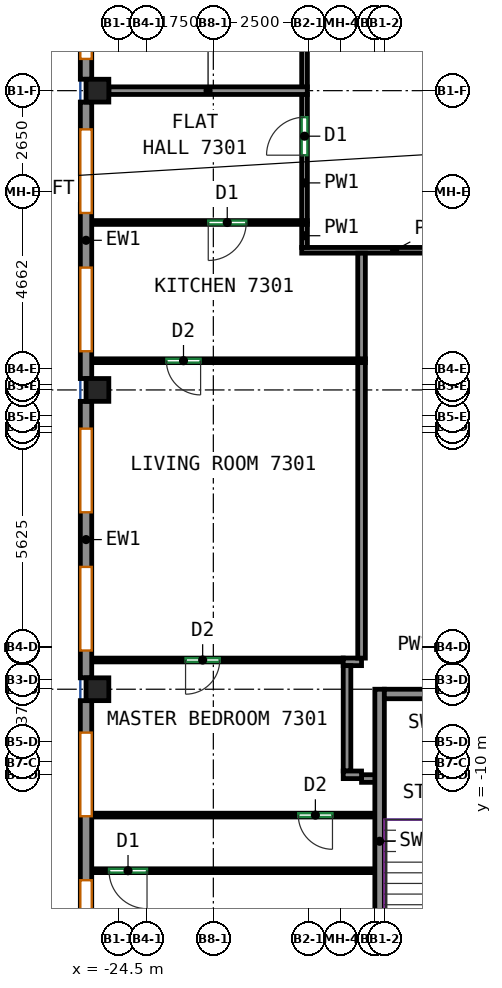
"""IFC4 building model, lengths in metres.
Left out: names, types, materials, properties, quantities, classifications, styles, units other than length and angle.
Written with IfcOpenShell. Run it as: python <this file> out.ifc"""

import sys

from ifc_helpers import new_model, si_unit, direction, frame, frame_2d, origin, origin_2d, place, context, subcontext, project, spatial, rectangle, extrude, source, transform, mapped, element, fill, save


model = new_model("IFC4")
c1 = context("Model", 3, precision=1e-05, world=origin(), true_north=direction((0.0, 1.0)))
c2 = subcontext(c1, "Body", "Model", "MODEL_VIEW")
j1 = project(units=[si_unit("LENGTHUNIT", "METRE"), si_unit("PLANEANGLEUNIT", "RADIAN")], contexts=[c1])
p1 = place(None, origin())
s1 = spatial("IfcSite", under=j1, at=p1, CompositionType="ELEMENT")
p2 = place(p1, origin())
s2 = spatial("IfcBuilding", under=s1, at=p2, CompositionType="ELEMENT")
p3 = place(p2, frame((0.0, 0.0, 295.0)))
s3 = spatial("IfcBuildingStorey", under=s2, at=p3, CompositionType="ELEMENT", Elevation=295.0)
m1 = source(origin(), c2, "Body", "SweptSolid", [
    extrude(rectangle(XDim=0.6, YDim=0.6, at=origin_2d()), origin(), (0.0, 0.0, 1.0), 3.12),
])
for number, where, z_axis, x_axis in (
    (1, (-25.05, -7.75, 0.0), (0.0, 0.0, 1.0), (1.0, 0.0, 0.0)),
    (2, (-25.05, 0.125, 0.0), (0.0, 0.0, 1.0), (1.0, 0.0, 0.0)),
    (3, (-25.05, 8.0, 0.0), (0.0, 0.0, 1.0), (1.0, 0.0, 0.0)),
):
    element("IfcColumn", number, at=place(p3, frame(where, z_axis=z_axis, x_axis=x_axis)), inside=s3, PredefinedType="COLUMN", context=c2, shape_type="MappedRepresentation", body=[
        mapped(m1, transform((0.0, 0.0, 0.0))),
    ])
m2 = source(origin(), c2, "Body", "SweptSolid", [
    extrude(rectangle(XDim=8.0, YDim=0.25, at=frame_2d((4.0, 0.0))), origin(), (0.0, 0.0, 1.0), 3.12),
])
p4 = place(p3, frame((-17.625, -15.75, 0.0), z_axis=(0.0, 0.0, 1.0), x_axis=(0.0, 1.0, 0.0)))
e4 = element("IfcWall", 4, at=p4, inside=s3, PredefinedType="SHEAR", context=c2, shape_type="MappedRepresentation", body=[
    mapped(m2, transform((0.0, 0.0, 0.0))),
])
m3 = source(origin(), c2, "Body", "SweptSolid", [
    extrude(rectangle(XDim=3.7, YDim=0.25, at=frame_2d((1.85, 0.0))), origin(), (0.0, 0.0, 1.0), 3.12),
])
p5 = place(p3, frame((-17.5, -7.875, 0.0), z_axis=(0.0, 0.0, 1.0), x_axis=(1.0, 0.0, 0.0)))
e5 = element("IfcWall", 5, at=p5, inside=s3, PredefinedType="SHEAR", context=c2, shape_type="MappedRepresentation", body=[
    mapped(m3, transform((0.0, 0.0, 0.0))),
])
m4 = source(origin(), c2, "Body", "SweptSolid", [
    extrude(rectangle(XDim=13.082, YDim=0.3, at=frame_2d((6.541, 0.0))), origin(), (0.0, 0.0, 1.0), 3.12),
])
p6 = place(p3, frame((-25.35, 21.382, 0.0), z_axis=(0.0, 0.0, 1.0), x_axis=(0.0, -1.0, 0.0)))
e6 = element("IfcWall", 6, at=p6, inside=s3, PredefinedType="SOLIDWALL", context=c2, shape_type="MappedRepresentation", body=[
    mapped(m4, transform((0.0, 0.0, 0.0))),
])
p7 = place(p6, frame((0.535, 0.0, 0.8)))
e7 = element("IfcOpeningElement", 7, at=p7, cuts=e6, PredefinedType="OPENING", context=c2, shape_type="SweptSolid", body=[
    extrude(rectangle(XDim=2.2, YDim=2.05, at=frame_2d((1.1, 1.025))), frame((0.0, 0.16, 0.0), z_axis=(0.0, -1.0, 0.0), x_axis=(1.0, 0.0, 0.0)), (0.0, 0.0, 1.0), 0.32),
])
p8 = place(p6, frame((3.806, 0.0, 0.8)))
e8 = element("IfcOpeningElement", 8, at=p8, cuts=e6, PredefinedType="OPENING", context=c2, shape_type="SweptSolid", body=[
    extrude(rectangle(XDim=2.2, YDim=2.05, at=frame_2d((1.1, 1.025))), frame((0.0, 0.16, 0.0), z_axis=(0.0, -1.0, 0.0), x_axis=(1.0, 0.0, 0.0)), (0.0, 0.0, 1.0), 0.32),
])
p9 = place(p6, frame((7.076, 0.0, 0.8)))
e9 = element("IfcOpeningElement", 9, at=p9, cuts=e6, PredefinedType="OPENING", context=c2, shape_type="SweptSolid", body=[
    extrude(rectangle(XDim=2.2, YDim=2.05, at=frame_2d((1.1, 1.025))), frame((0.0, 0.16, 0.0), z_axis=(0.0, -1.0, 0.0), x_axis=(1.0, 0.0, 0.0)), (0.0, 0.0, 1.0), 0.32),
])
p10 = place(p6, frame((10.347, 0.0, 0.8)))
e10 = element("IfcOpeningElement", 10, at=p10, cuts=e6, PredefinedType="OPENING", context=c2, shape_type="SweptSolid", body=[
    extrude(rectangle(XDim=2.2, YDim=2.05, at=frame_2d((1.1, 1.025))), frame((0.0, 0.16, 0.0), z_axis=(0.0, -1.0, 0.0), x_axis=(1.0, 0.0, 0.0)), (0.0, 0.0, 1.0), 0.32),
])
m5 = source(origin(), c2, "Body", "SweptSolid", [
    extrude(rectangle(XDim=7.275, YDim=0.3, at=frame_2d((3.637, 0.0))), origin(), (0.0, 0.0, 1.0), 3.12),
])
p11 = place(p3, frame((-25.35, 7.7, 0.0), z_axis=(0.0, 0.0, 1.0), x_axis=(0.0, -1.0, 0.0)))
e11 = element("IfcWall", 11, at=p11, inside=s3, PredefinedType="SOLIDWALL", context=c2, shape_type="MappedRepresentation", body=[
    mapped(m5, transform((0.0, 0.0, 0.0))),
])
p12 = place(p11, frame((0.719, 0.0, 0.8)))
e12 = element("IfcOpeningElement", 12, at=p12, cuts=e11, PredefinedType="OPENING", context=c2, shape_type="SweptSolid", body=[
    extrude(rectangle(XDim=2.2, YDim=2.05, at=frame_2d((1.1, 1.025))), frame((0.0, 0.16, 0.0), z_axis=(0.0, -1.0, 0.0), x_axis=(1.0, 0.0, 0.0)), (0.0, 0.0, 1.0), 0.32),
])
p13 = place(p11, frame((4.356, 0.0, 0.8)))
e13 = element("IfcOpeningElement", 13, at=p13, cuts=e11, PredefinedType="OPENING", context=c2, shape_type="SweptSolid", body=[
    extrude(rectangle(XDim=2.2, YDim=2.05, at=frame_2d((1.1, 1.025))), frame((0.0, 0.16, 0.0), z_axis=(0.0, -1.0, 0.0), x_axis=(1.0, 0.0, 0.0)), (0.0, 0.0, 1.0), 0.32),
])
p14 = place(p3, frame((-25.35, -0.175, 0.0), z_axis=(0.0, 0.0, 1.0), x_axis=(0.0, -1.0, 0.0)))
e14 = element("IfcWall", 14, at=p14, inside=s3, PredefinedType="SOLIDWALL", context=c2, shape_type="MappedRepresentation", body=[
    mapped(m5, transform((0.0, 0.0, 0.0))),
])
p15 = place(p14, frame((0.719, 0.0, 0.8)))
e15 = element("IfcOpeningElement", 15, at=p15, cuts=e14, PredefinedType="OPENING", context=c2, shape_type="SweptSolid", body=[
    extrude(rectangle(XDim=2.2, YDim=2.05, at=frame_2d((1.1, 1.025))), frame((0.0, 0.16, 0.0), z_axis=(0.0, -1.0, 0.0), x_axis=(1.0, 0.0, 0.0)), (0.0, 0.0, 1.0), 0.32),
])
p16 = place(p14, frame((4.356, 0.0, 0.8)))
e16 = element("IfcOpeningElement", 16, at=p16, cuts=e14, PredefinedType="OPENING", context=c2, shape_type="SweptSolid", body=[
    extrude(rectangle(XDim=2.2, YDim=2.05, at=frame_2d((1.1, 1.025))), frame((0.0, 0.16, 0.0), z_axis=(0.0, -1.0, 0.0), x_axis=(1.0, 0.0, 0.0)), (0.0, 0.0, 1.0), 0.32),
])
m6 = source(origin(), c2, "Body", "SweptSolid", [
    extrude(rectangle(XDim=11.65, YDim=0.3, at=frame_2d((5.825, 0.0))), origin(), (0.0, 0.0, 1.0), 3.12),
])
p17 = place(p3, frame((-25.35, -8.05, 0.0), z_axis=(0.0, 0.0, 1.0), x_axis=(0.0, -1.0, 0.0)))
e17 = element("IfcWall", 17, at=p17, inside=s3, PredefinedType="SOLIDWALL", context=c2, shape_type="MappedRepresentation", body=[
    mapped(m6, transform((0.0, 0.0, 0.0))),
])
p18 = place(p17, frame((0.842, 0.0, 0.8)))
e18 = element("IfcOpeningElement", 18, at=p18, cuts=e17, PredefinedType="OPENING", context=c2, shape_type="SweptSolid", body=[
    extrude(rectangle(XDim=2.2, YDim=2.05, at=frame_2d((1.1, 1.025))), frame((0.0, 0.16, 0.0), z_axis=(0.0, -1.0, 0.0), x_axis=(1.0, 0.0, 0.0)), (0.0, 0.0, 1.0), 0.32),
])
p19 = place(p17, frame((4.725, 0.0, 0.8)))
e19 = element("IfcOpeningElement", 19, at=p19, cuts=e17, PredefinedType="OPENING", context=c2, shape_type="SweptSolid", body=[
    extrude(rectangle(XDim=2.2, YDim=2.05, at=frame_2d((1.1, 1.025))), frame((0.0, 0.16, 0.0), z_axis=(0.0, -1.0, 0.0), x_axis=(1.0, 0.0, 0.0)), (0.0, 0.0, 1.0), 0.32),
])
p20 = place(p17, frame((8.617, 0.0, 0.8)))
e20 = element("IfcOpeningElement", 20, at=p20, cuts=e17, PredefinedType="OPENING", context=c2, shape_type="SweptSolid", body=[
    extrude(rectangle(XDim=0.8, YDim=2.05, at=frame_2d((0.4, 1.025))), frame((0.0, 0.16, 0.0), z_axis=(0.0, -1.0, 0.0), x_axis=(1.0, 0.0, 0.0)), (0.0, 0.0, 1.0), 0.32),
])
p21 = place(p17, frame((9.742, 0.0, 0.8)))
e21 = element("IfcOpeningElement", 21, at=p21, cuts=e17, PredefinedType="OPENING", context=c2, shape_type="SweptSolid", body=[
    extrude(rectangle(XDim=1.05, YDim=2.05, at=frame_2d((0.525, 1.025))), frame((0.0, 0.16, 0.0), z_axis=(0.0, -1.0, 0.0), x_axis=(1.0, 0.0, 0.0)), (0.0, 0.0, 1.0), 0.32),
])
p22 = place(p3, frame((-19.675, 3.8, 0.0), z_axis=(0.0, 0.0, 1.0), x_axis=(1.0, 0.0, 0.0)))
e22 = element("IfcWall", 22, at=p22, inside=s3, PredefinedType="PARTITIONING", context=c2, shape_type="SweptSolid", body=[
    extrude(rectangle(XDim=4.89, YDim=0.15, at=frame_2d((2.445, 0.0))), origin(), (0.0, 0.0, 1.0), 3.12),
])
p23 = place(p3, frame((-19.6, 3.875, 0.0), z_axis=(0.0, 0.0, 1.0), x_axis=(0.0, 1.0, 0.0)))
e23 = element("IfcWall", 23, at=p23, inside=s3, PredefinedType="PARTITIONING", context=c2, shape_type="SweptSolid", body=[
    extrude(rectangle(XDim=0.616, YDim=0.15, at=frame_2d((0.308, 0.0))), origin(), (0.0, 0.0, 1.0), 3.12),
])
p24 = place(p3, frame((-19.6, 4.571, 0.0), z_axis=(0.0, 0.0, 1.0), x_axis=(0.0, 1.0, 0.0)))
e24 = element("IfcWall", 24, at=p24, inside=s3, PredefinedType="PARTITIONING", context=c2, shape_type="SweptSolid", body=[
    extrude(rectangle(XDim=3.339, YDim=0.15, at=frame_2d((1.669, 0.0))), origin(), (0.0, 0.0, 1.0), 3.12),
])
p25 = place(p24, frame((1.731, 0.0, 0.0)))
e25 = element("IfcOpeningElement", 25, at=p25, cuts=e24, PredefinedType="OPENING", context=c2, shape_type="SweptSolid", body=[
    extrude(rectangle(XDim=1.0, YDim=2.1, at=frame_2d((0.5, 1.05))), frame((0.0, 0.085, 0.0), z_axis=(0.0, -1.0, 0.0), x_axis=(1.0, 0.0, 0.0)), (0.0, 0.0, 1.0), 0.17),
])
p26 = place(p3, frame((-19.6, 8.09, 0.0), z_axis=(0.0, 0.0, 1.0), x_axis=(0.0, 1.0, 0.0)))
e26 = element("IfcWall", 26, at=p26, inside=s3, PredefinedType="PARTITIONING", context=c2, shape_type="SweptSolid", body=[
    extrude(rectangle(XDim=15.635, YDim=0.15, at=frame_2d((7.817, 0.0))), origin(), (0.0, 0.0, 1.0), 3.12),
])
p27 = place(p3, frame((-17.75, -12.525, 0.0), z_axis=(0.0, 0.0, 1.0), x_axis=(-1.0, 0.0, 0.0)))
e27 = element("IfcWall", 27, at=p27, inside=s3, PredefinedType="PARTITIONING", context=c2, shape_type="SweptSolid", body=[
    extrude(rectangle(XDim=7.5, YDim=0.1, at=frame_2d((3.75, 0.0))), origin(), (0.0, 0.0, 1.0), 3.12),
])
p28 = place(p27, frame((5.995, 0.0, 0.0)))
e28 = element("IfcOpeningElement", 28, at=p28, cuts=e27, PredefinedType="OPENING", context=c2, shape_type="SweptSolid", body=[
    extrude(rectangle(XDim=1.0, YDim=2.1, at=frame_2d((0.5, 1.05))), frame((0.0, 0.06, 0.0), z_axis=(0.0, -1.0, 0.0), x_axis=(1.0, 0.0, 0.0)), (0.0, 0.0, 1.0), 0.12),
])
p29 = place(p3, frame((-17.75, -11.062, 0.0), z_axis=(0.0, 0.0, 1.0), x_axis=(-1.0, 0.0, 0.0)))
e29 = element("IfcWall", 29, at=p29, inside=s3, PredefinedType="PARTITIONING", context=c2, shape_type="SweptSolid", body=[
    extrude(rectangle(XDim=7.5, YDim=0.1, at=frame_2d((3.75, 0.0))), origin(), (0.0, 0.0, 1.0), 3.12),
])
p30 = place(p29, frame((1.115, 0.0, 0.0)))
e30 = element("IfcOpeningElement", 30, at=p30, cuts=e29, PredefinedType="OPENING", context=c2, shape_type="SweptSolid", body=[
    extrude(rectangle(XDim=0.9, YDim=2.1, at=frame_2d((0.45, 1.05))), frame((0.0, 0.06, 0.0), z_axis=(0.0, -1.0, 0.0), x_axis=(1.0, 0.0, 0.0)), (0.0, 0.0, 1.0), 0.12),
])
p31 = place(p3, frame((-18.582, -6.981, 0.0), z_axis=(0.0, 0.0, 1.0), x_axis=(-1.0, 0.0, 0.0)))
e31 = element("IfcWall", 31, at=p31, inside=s3, PredefinedType="PARTITIONING", context=c2, shape_type="SweptSolid", body=[
    extrude(rectangle(XDim=6.668, YDim=0.1, at=frame_2d((3.334, 0.0))), origin(), (0.0, 0.0, 1.0), 3.12),
])
p32 = place(p31, frame((3.249, 0.0, 0.0)))
e32 = element("IfcOpeningElement", 32, at=p32, cuts=e31, PredefinedType="OPENING", context=c2, shape_type="SweptSolid", body=[
    extrude(rectangle(XDim=0.9, YDim=2.1, at=frame_2d((0.45, 1.05))), frame((0.0, 0.06, 0.0), z_axis=(0.0, -1.0, 0.0), x_axis=(1.0, 0.0, 0.0)), (0.0, 0.0, 1.0), 0.12),
])
p33 = place(p3, frame((-17.7, -10.1, 0.0), z_axis=(0.0, 0.0, 1.0), x_axis=(-1.0, 0.0, 0.0)))
e33 = element("IfcWall", 33, at=p33, inside=s3, PredefinedType="PARTITIONING", context=c2, shape_type="SweptSolid", body=[
    extrude(rectangle(XDim=0.4, YDim=0.2, at=frame_2d((0.2, 0.0))), origin(), (0.0, 0.0, 1.0), 3.12),
])
p34 = place(p3, frame((-18.582, -7.029, 0.0), z_axis=(0.0, 0.0, 1.0), x_axis=(1.0, 0.0, 0.0)))
e34 = element("IfcWall", 34, at=p34, inside=s3, PredefinedType="PARTITIONING", context=c2, shape_type="SweptSolid", body=[
    extrude(rectangle(XDim=0.482, YDim=0.2, at=frame_2d((0.241, 0.0))), origin(), (0.0, 0.0, 1.0), 3.12),
])
p35 = place(p3, frame((-18.482, -9.902, 0.0), z_axis=(0.0, 0.0, 1.0), x_axis=(0.0, 1.0, 0.0)))
e35 = element("IfcWall", 35, at=p35, inside=s3, PredefinedType="PARTITIONING", context=c2, shape_type="SweptSolid", body=[
    extrude(rectangle(XDim=2.773, YDim=0.2, at=frame_2d((1.387, 0.0))), origin(), (0.0, 0.0, 1.0), 3.12),
])
p36 = place(p3, frame((-18.1, -10.002, 0.0), z_axis=(0.0, 0.0, 1.0), x_axis=(-1.0, 0.0, 0.0)))
e36 = element("IfcWall", 36, at=p36, inside=s3, PredefinedType="PARTITIONING", context=c2, shape_type="SweptSolid", body=[
    extrude(rectangle(XDim=0.482, YDim=0.2, at=frame_2d((0.241, 0.0))), origin(), (0.0, 0.0, 1.0), 3.12),
])
p37 = place(p3, frame((-18.0, 0.894, 0.0), z_axis=(0.0, 0.0, 1.0), x_axis=(-1.0, 0.0, 0.0)))
e37 = element("IfcWall", 37, at=p37, inside=s3, PredefinedType="PARTITIONING", context=c2, shape_type="SweptSolid", body=[
    extrude(rectangle(XDim=7.25, YDim=0.1, at=frame_2d((3.625, 0.0))), origin(), (0.0, 0.0, 1.0), 3.12),
])
p38 = place(p37, frame((4.335, 0.0, 0.0)))
e38 = element("IfcOpeningElement", 38, at=p38, cuts=e37, PredefinedType="OPENING", context=c2, shape_type="SweptSolid", body=[
    extrude(rectangle(XDim=0.9, YDim=2.1, at=frame_2d((0.45, 1.05))), frame((0.0, 0.06, 0.0), z_axis=(0.0, -1.0, 0.0), x_axis=(1.0, 0.0, 0.0)), (0.0, 0.0, 1.0), 0.12),
])
p39 = place(p3, frame((-18.1, -6.931, 0.0), z_axis=(0.0, 0.0, 1.0), x_axis=(0.0, 1.0, 0.0)))
e39 = element("IfcWall", 39, at=p39, inside=s3, PredefinedType="PARTITIONING", context=c2, shape_type="SweptSolid", body=[
    extrude(rectangle(XDim=7.775, YDim=0.2, at=frame_2d((3.887, 0.0))), origin(), (0.0, 0.0, 1.0), 3.12),
])
p40 = place(p3, frame((-19.527, 4.531, 0.0), z_axis=(0.0, 0.0, 1.0), x_axis=(-1.0, 0.0, 0.0)))
e40 = element("IfcWall", 40, at=p40, inside=s3, PredefinedType="PARTITIONING", context=c2, shape_type="SweptSolid", body=[
    extrude(rectangle(XDim=5.723, YDim=0.1, at=frame_2d((2.861, 0.0))), origin(), (0.0, 0.0, 1.0), 3.12),
])
p41 = place(p40, frame((1.607, 0.0, 0.0)))
e41 = element("IfcOpeningElement", 41, at=p41, cuts=e40, PredefinedType="OPENING", context=c2, shape_type="SweptSolid", body=[
    extrude(rectangle(XDim=1.0, YDim=2.1, at=frame_2d((0.5, 1.05))), frame((0.0, 0.06, 0.0), z_axis=(0.0, -1.0, 0.0), x_axis=(1.0, 0.0, 0.0)), (0.0, 0.0, 1.0), 0.12),
])
p42 = place(p3, frame((-18.1, 0.944, 0.0), z_axis=(0.0, 0.0, 1.0), x_axis=(0.0, 1.0, 0.0)))
e42 = element("IfcWall", 42, at=p42, inside=s3, PredefinedType="PARTITIONING", context=c2, shape_type="SweptSolid", body=[
    extrude(rectangle(XDim=2.779, YDim=0.2, at=frame_2d((1.389, 0.0))), origin(), (0.0, 0.0, 1.0), 3.12),
])
p43 = place(p3, frame((-19.527, 8.0, 0.0), z_axis=(0.0, 0.0, 1.0), x_axis=(-1.0, 0.0, 0.0)))
e43 = element("IfcWall", 43, at=p43, inside=s3, PredefinedType="PARTITIONING", context=c2, shape_type="SweptSolid", body=[
    extrude(rectangle(XDim=5.223, YDim=0.2, at=frame_2d((2.611, 0.0))), origin(), (0.0, 0.0, 1.0), 2.57),
])
p44 = place(p10, origin())
e44 = element("IfcWindow", 44, at=p44, inside=s3, PartitioningType="SINGLE_PANEL", PredefinedType="WINDOW", context=c2, shape_type="SweptSolid", body=[
    extrude(rectangle(XDim=2.2, YDim=2.05, at=frame_2d((1.1, 1.025))), frame((0.0, 0.03, 0.0), z_axis=(0.0, -1.0, 0.0), x_axis=(1.0, 0.0, 0.0)), (0.0, 0.0, 1.0), 0.06),
])
fill(e10, e44)
p45 = place(p12, origin())
e45 = element("IfcWindow", 45, at=p45, inside=s3, PartitioningType="SINGLE_PANEL", PredefinedType="WINDOW", context=c2, shape_type="SweptSolid", body=[
    extrude(rectangle(XDim=2.2, YDim=2.05, at=frame_2d((1.1, 1.025))), frame((0.0, 0.03, 0.0), z_axis=(0.0, -1.0, 0.0), x_axis=(1.0, 0.0, 0.0)), (0.0, 0.0, 1.0), 0.06),
])
fill(e12, e45)
p46 = place(p13, origin())
e46 = element("IfcWindow", 46, at=p46, inside=s3, PartitioningType="SINGLE_PANEL", PredefinedType="WINDOW", context=c2, shape_type="SweptSolid", body=[
    extrude(rectangle(XDim=2.2, YDim=2.05, at=frame_2d((1.1, 1.025))), frame((0.0, 0.03, 0.0), z_axis=(0.0, -1.0, 0.0), x_axis=(1.0, 0.0, 0.0)), (0.0, 0.0, 1.0), 0.06),
])
fill(e13, e46)
p47 = place(p15, origin())
e47 = element("IfcWindow", 47, at=p47, inside=s3, PartitioningType="SINGLE_PANEL", PredefinedType="WINDOW", context=c2, shape_type="SweptSolid", body=[
    extrude(rectangle(XDim=2.2, YDim=2.05, at=frame_2d((1.1, 1.025))), frame((0.0, 0.03, 0.0), z_axis=(0.0, -1.0, 0.0), x_axis=(1.0, 0.0, 0.0)), (0.0, 0.0, 1.0), 0.06),
])
fill(e15, e47)
p48 = place(p16, origin())
e48 = element("IfcWindow", 48, at=p48, inside=s3, PartitioningType="SINGLE_PANEL", PredefinedType="WINDOW", context=c2, shape_type="SweptSolid", body=[
    extrude(rectangle(XDim=2.2, YDim=2.05, at=frame_2d((1.1, 1.025))), frame((0.0, 0.03, 0.0), z_axis=(0.0, -1.0, 0.0), x_axis=(1.0, 0.0, 0.0)), (0.0, 0.0, 1.0), 0.06),
])
fill(e16, e48)
p49 = place(p18, origin())
e49 = element("IfcWindow", 49, at=p49, inside=s3, PartitioningType="SINGLE_PANEL", PredefinedType="WINDOW", context=c2, shape_type="SweptSolid", body=[
    extrude(rectangle(XDim=2.2, YDim=2.05, at=frame_2d((1.1, 1.025))), frame((0.0, 0.03, 0.0), z_axis=(0.0, -1.0, 0.0), x_axis=(1.0, 0.0, 0.0)), (0.0, 0.0, 1.0), 0.06),
])
fill(e18, e49)
p50 = place(p19, origin())
e50 = element("IfcWindow", 50, at=p50, inside=s3, PartitioningType="SINGLE_PANEL", PredefinedType="WINDOW", context=c2, shape_type="SweptSolid", body=[
    extrude(rectangle(XDim=2.2, YDim=2.05, at=frame_2d((1.1, 1.025))), frame((0.0, 0.03, 0.0), z_axis=(0.0, -1.0, 0.0), x_axis=(1.0, 0.0, 0.0)), (0.0, 0.0, 1.0), 0.06),
])
fill(e19, e50)
p51 = place(p28, origin())
e51 = element("IfcDoor", 51, at=p51, inside=s3, OperationType="SINGLE_SWING_LEFT", PredefinedType="DOOR", context=c2, shape_type="SweptSolid", body=[
    extrude(rectangle(XDim=1.0, YDim=2.1, at=frame_2d((0.5, 1.05))), frame((0.0, 0.025, 0.0), z_axis=(0.0, -1.0, 0.0), x_axis=(1.0, 0.0, 0.0)), (0.0, 0.0, 1.0), 0.05),
])
fill(e28, e51)
p52 = place(p30, origin())
e52 = element("IfcDoor", 52, at=p52, inside=s3, OperationType="SINGLE_SWING_LEFT", PredefinedType="DOOR", context=c2, shape_type="SweptSolid", body=[
    extrude(rectangle(XDim=0.9, YDim=2.1, at=frame_2d((0.45, 1.05))), frame((0.0, 0.025, 0.0), z_axis=(0.0, -1.0, 0.0), x_axis=(1.0, 0.0, 0.0)), (0.0, 0.0, 1.0), 0.05),
])
fill(e30, e52)
p53 = place(p32, origin())
e53 = element("IfcDoor", 53, at=p53, inside=s3, OperationType="SINGLE_SWING_RIGHT", PredefinedType="DOOR", context=c2, shape_type="SweptSolid", body=[
    extrude(rectangle(XDim=0.9, YDim=2.1, at=frame_2d((0.45, 1.05))), frame((0.0, 0.025, 0.0), z_axis=(0.0, -1.0, 0.0), x_axis=(1.0, 0.0, 0.0)), (0.0, 0.0, 1.0), 0.05),
])
fill(e32, e53)
p54 = place(p38, origin())
e54 = element("IfcDoor", 54, at=p54, inside=s3, OperationType="SINGLE_SWING_LEFT", PredefinedType="DOOR", context=c2, shape_type="SweptSolid", body=[
    extrude(rectangle(XDim=0.9, YDim=2.1, at=frame_2d((0.45, 1.05))), frame((0.0, 0.025, 0.0), z_axis=(0.0, -1.0, 0.0), x_axis=(1.0, 0.0, 0.0)), (0.0, 0.0, 1.0), 0.05),
])
fill(e38, e54)
p55 = place(p41, origin())
e55 = element("IfcDoor", 55, at=p55, inside=s3, OperationType="SINGLE_SWING_RIGHT", PredefinedType="DOOR", context=c2, shape_type="SweptSolid", body=[
    extrude(rectangle(XDim=1.0, YDim=2.1, at=frame_2d((0.5, 1.05))), frame((0.0, 0.025, 0.0), z_axis=(0.0, -1.0, 0.0), x_axis=(1.0, 0.0, 0.0)), (0.0, 0.0, 1.0), 0.05),
])
fill(e41, e55)
p56 = place(p25, origin())
e56 = element("IfcDoor", 56, at=p56, inside=s3, OperationType="SINGLE_SWING_LEFT", PredefinedType="DOOR", context=c2, shape_type="SweptSolid", body=[
    extrude(rectangle(XDim=1.0, YDim=2.1, at=frame_2d((0.5, 1.05))), frame((0.0, 0.025, 0.0), z_axis=(0.0, -1.0, 0.0), x_axis=(1.0, 0.0, 0.0)), (0.0, 0.0, 1.0), 0.05),
])
fill(e25, e56)
save(model, sys.argv[1])
